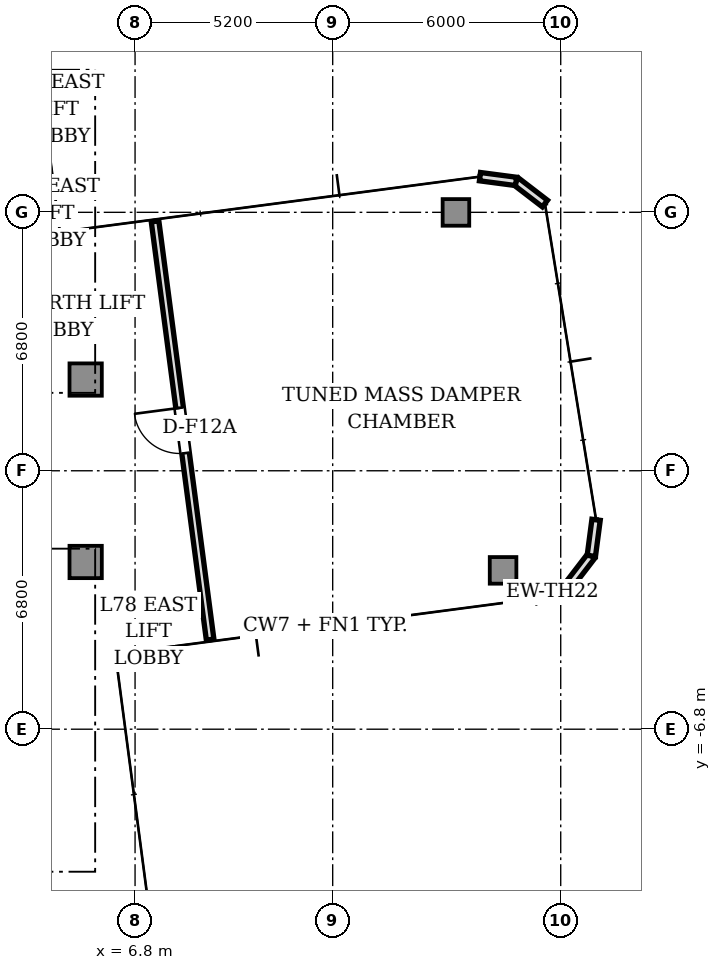
"""IFC4 building model, lengths in metres.
Left out: names, types, materials, properties, quantities, classifications, styles, units other than length and angle.
Written with IfcOpenShell. Run it as: python <this file> out.ifc"""

import sys

from ifc_helpers import new_model, si_unit, direction, frame, frame_2d, origin, origin_2d, place, context, subcontext, project, spatial, rectangle, extrude, source, transform, mapped, element, fill, save


model = new_model("IFC4")
c1 = context("Model", 3, precision=1e-05, world=origin(), true_north=direction((0.0, 1.0)))
c2 = subcontext(c1, "Body", "Model", "MODEL_VIEW")
j1 = project(units=[si_unit("LENGTHUNIT", "METRE"), si_unit("PLANEANGLEUNIT", "RADIAN")], contexts=[c1])
p1 = place(None, origin())
s1 = spatial("IfcSite", under=j1, at=p1, CompositionType="ELEMENT")
p2 = place(p1, origin())
s2 = spatial("IfcBuilding", under=s1, at=p2, CompositionType="ELEMENT")
p3 = place(p2, frame((0.0, 0.0, 280.3)))
s3 = spatial("IfcBuildingStorey", under=s2, at=p3, CompositionType="ELEMENT", Elevation=280.3)
m1 = source(origin(), c2, "Body", "SweptSolid", [
    extrude(rectangle(XDim=0.85, YDim=0.85, at=origin_2d()), origin(), (0.0, 0.0, 1.0), 4.5),
])
for number, where, z_axis, x_axis in (
    (1, (5.5, 2.4, 0.0), (0.0, 0.0, 1.0), (1.0, 0.0, 0.0)),
    (2, (5.5, -2.4, 0.0), (0.0, 0.0, 1.0), (1.0, 0.0, 0.0)),
):
    element("IfcColumn", number, at=place(p3, frame(where, z_axis=z_axis, x_axis=x_axis)), inside=s3, PredefinedType="COLUMN", context=c2, shape_type="MappedRepresentation", body=[
        mapped(m1, transform((0.0, 0.0, 0.0), scale=1.0)),
    ])
m2 = source(origin(), c2, "Body", "SweptSolid", [
    extrude(rectangle(XDim=0.7, YDim=0.7, at=origin_2d()), origin(), (0.0, 0.0, 1.0), 4.5),
])
for number, where, z_axis, x_axis in (
    (3, (16.483, -2.621, 0.0), (0.0, 0.0, 1.0), (1.0, 0.0, 0.0)),
    (4, (15.243, 6.798, 0.0), (0.0, 0.0, 1.0), (1.0, 0.0, 0.0)),
):
    element("IfcColumn", number, at=place(p3, frame(where, z_axis=z_axis, x_axis=x_axis)), inside=s3, PredefinedType="COLUMN", context=c2, shape_type="MappedRepresentation", body=[
        mapped(m2, transform((0.0, 0.0, 0.0), scale=1.0)),
    ])
for number, where, z_axis, x_axis in (
    (5, (17.338, -3.366, 0.0), (0.0, 0.0, 1.0), (0.924, 0.383, 0.0)),
    (6, (18.222, -2.999, 0.0), (0.0, 0.0, 1.0), (0.609, 0.793, 0.0)),
    (7, (18.805, -2.24, 0.0), (0.0, 0.0, 1.0), (0.131, 0.991, 0.0)),
):
    element("IfcWall", number, at=place(p3, frame(where, z_axis=z_axis, x_axis=x_axis)), inside=s3, PredefinedType="STANDARD", context=c2, shape_type="SweptSolid", body=[
        extrude(rectangle(XDim=0.958, YDim=0.22, at=frame_2d((0.479, 0.0))), origin(), (0.0, 0.0, 1.0), 4.5),
    ])
p4 = place(p3, frame((17.585, 7.031, 0.0), z_axis=(0.0, 0.0, 1.0), x_axis=(-0.793466811674, 0.60861352168, 0.0)))
e8 = element("IfcWall", 8, at=p4, inside=s3, PredefinedType="STANDARD", context=c2, shape_type="SweptSolid", body=[
    extrude(rectangle(XDim=0.958, YDim=0.22, at=frame_2d((0.479, 0.0))), origin(), (0.0, 0.0, 1.0), 4.5),
])
p5 = place(p3, frame((16.825, 7.613, 0.0), z_axis=(0.0, 0.0, 1.0), x_axis=(-0.991444747987, 0.130527053476, 0.0)))
e9 = element("IfcWall", 9, at=p5, inside=s3, PredefinedType="STANDARD", context=c2, shape_type="SweptSolid", body=[
    extrude(rectangle(XDim=0.958, YDim=0.22, at=frame_2d((0.479, 0.0))), origin(), (0.0, 0.0, 1.0), 4.5),
])
p6 = place(p3, frame((8.775, -4.443, 0.0), z_axis=(0.0, 0.0, 1.0), x_axis=(-0.130515390239, 0.991446283422, 0.0)))
e10 = element("IfcWall", 10, at=p6, inside=s3, PredefinedType="SOLIDWALL", context=c2, shape_type="SweptSolid", body=[
    extrude(rectangle(XDim=11.1, YDim=0.2, at=frame_2d((5.55, 0.0))), origin(), (0.0, 0.0, 1.0), 4.05),
])
p7 = place(p6, frame((4.95, 0.0, 0.0)))
e11 = element("IfcOpeningElement", 11, at=p7, cuts=e10, PredefinedType="OPENING", context=c2, shape_type="SweptSolid", body=[
    extrude(rectangle(XDim=1.2, YDim=2.2, at=frame_2d((0.6, 1.1))), frame((0.0, 0.11, 0.0), z_axis=(0.0, -1.0, 0.0), x_axis=(1.0, 0.0, 0.0)), (0.0, 0.0, 1.0), 0.22),
])
m3 = source(origin(), c2, "Body", "SweptSolid", [
    extrude(rectangle(XDim=1.2, YDim=0.05, at=origin_2d()), origin(), (0.0, 0.0, 1.0), 2.2),
])
p8 = place(p7, frame((0.6, 0.0, 0.0)))
e12 = element("IfcDoor", 12, at=p8, inside=s3, OperationType="SINGLE_SWING_RIGHT", PredefinedType="DOOR", context=c2, shape_type="MappedRepresentation", body=[
    mapped(m3, transform((0.0, 0.0, 0.0), scale=1.0)),
])
fill(e11, e12)
save(model, sys.argv[1])
